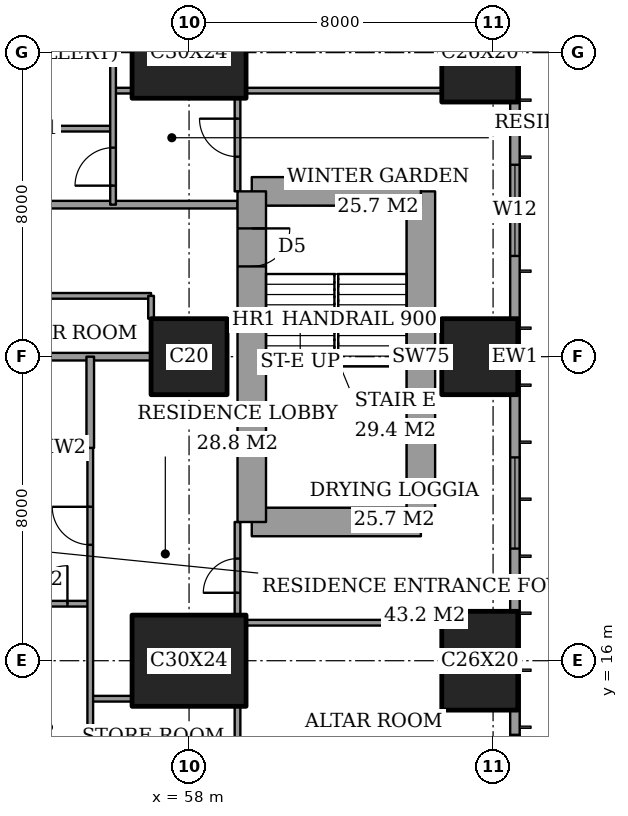
"""IFC4 building model, lengths in metres.
Left out: names, types, materials, properties, quantities, classifications, styles, units other than length and angle.
Written with IfcOpenShell. Run it as: python <this file> out.ifc"""

import sys

from ifc_helpers import new_model, si_unit, direction, frame, frame_2d, origin, origin_2d, place, context, subcontext, project, spatial, rectangle, extrude, element, fill, save


model = new_model("IFC4")
c1 = context("Model", 3, precision=1e-05, world=origin(), true_north=direction((0.0, 1.0)))
c2 = subcontext(c1, "Body", "Model", "MODEL_VIEW")
j1 = project(units=[si_unit("LENGTHUNIT", "METRE"), si_unit("PLANEANGLEUNIT", "RADIAN")], contexts=[c1])
p1 = place(None, origin())
s1 = spatial("IfcSite", under=j1, at=p1, CompositionType="ELEMENT")
p2 = place(p1, origin())
s2 = spatial("IfcBuilding", under=s1, at=p2, CompositionType="ELEMENT")
p3 = place(p2, frame((0.0, 0.0, 153.8)))
s3 = spatial("IfcBuildingStorey", under=s2, at=p3, CompositionType="ELEMENT", Elevation=153.8)
p4 = place(p3, frame((58.0, 16.0, 0.0), z_axis=(0.0, 0.0, 1.0), x_axis=(1.0, 0.0, 0.0)))
e1 = element("IfcColumn", 1, at=p4, inside=s3, PredefinedType="COLUMN", context=c2, shape_type="SweptSolid", body=[
    extrude(rectangle(XDim=3.0, YDim=2.4, at=origin_2d()), origin(), (0.0, 0.0, 1.0), 3.6),
])
p5 = place(p3, frame((58.0, 24.0, 0.0), z_axis=(0.0, 0.0, 1.0), x_axis=(1.0, 0.0, 0.0)))
e2 = element("IfcColumn", 2, at=p5, inside=s3, PredefinedType="COLUMN", context=c2, shape_type="SweptSolid", body=[
    extrude(rectangle(XDim=2.0, YDim=2.0, at=origin_2d()), origin(), (0.0, 0.0, 1.0), 3.6),
])
p6 = place(p3, frame((58.0, 32.0, 0.0), z_axis=(0.0, 0.0, 1.0), x_axis=(1.0, 0.0, 0.0)))
e3 = element("IfcColumn", 3, at=p6, inside=s3, PredefinedType="COLUMN", context=c2, shape_type="SweptSolid", body=[
    extrude(rectangle(XDim=3.0, YDim=2.4, at=origin_2d()), origin(), (0.0, 0.0, 1.0), 3.6),
])
p7 = place(p3, frame((65.65, 16.0, 0.0), z_axis=(0.0, 0.0, 1.0), x_axis=(0.0, 1.0, 0.0)))
e4 = element("IfcColumn", 4, at=p7, inside=s3, PredefinedType="COLUMN", context=c2, shape_type="SweptSolid", body=[
    extrude(rectangle(XDim=2.6, YDim=2.0, at=origin_2d()), origin(), (0.0, 0.0, 1.0), 3.6),
])
p8 = place(p3, frame((65.65, 24.0, 0.0), z_axis=(0.0, 0.0, 1.0), x_axis=(1.0, 0.0, 0.0)))
e5 = element("IfcColumn", 5, at=p8, inside=s3, PredefinedType="COLUMN", context=c2, shape_type="SweptSolid", body=[
    extrude(rectangle(XDim=2.0, YDim=2.0, at=origin_2d()), origin(), (0.0, 0.0, 1.0), 3.6),
])
p9 = place(p3, frame((65.65, 32.0, 0.0), z_axis=(0.0, 0.0, 1.0), x_axis=(0.0, 1.0, 0.0)))
e6 = element("IfcColumn", 6, at=p9, inside=s3, PredefinedType="COLUMN", context=c2, shape_type="SweptSolid", body=[
    extrude(rectangle(XDim=2.6, YDim=2.0, at=origin_2d()), origin(), (0.0, 0.0, 1.0), 3.6),
])
p10 = place(p3, frame((59.65, 19.65, 0.0), z_axis=(0.0, 0.0, 1.0), x_axis=(1.0, 0.0, 0.0)))
e7 = element("IfcWall", 7, at=p10, inside=s3, PredefinedType="SHEAR", context=c2, shape_type="SweptSolid", body=[
    extrude(rectangle(XDim=4.45, YDim=0.75, at=frame_2d((2.225, 0.0))), origin(), (0.0, 0.0, 1.0), 3.6),
])
p11 = place(p3, frame((64.1, 19.65, 0.0), z_axis=(0.0, 0.0, 1.0), x_axis=(0.0, 1.0, 0.0)))
e8 = element("IfcWall", 8, at=p11, inside=s3, PredefinedType="SHEAR", context=c2, shape_type="SweptSolid", body=[
    extrude(rectangle(XDim=8.7, YDim=0.75, at=frame_2d((4.35, 0.0))), origin(), (0.0, 0.0, 1.0), 3.6),
])
p12 = place(p3, frame((64.1, 28.35, 0.0), z_axis=(0.0, 0.0, 1.0), x_axis=(-1.0, 0.0, 0.0)))
e9 = element("IfcWall", 9, at=p12, inside=s3, PredefinedType="SHEAR", context=c2, shape_type="SweptSolid", body=[
    extrude(rectangle(XDim=4.45, YDim=0.75, at=frame_2d((2.225, 0.0))), origin(), (0.0, 0.0, 1.0), 3.6),
])
p13 = place(p3, frame((59.65, 28.35, 0.0), z_axis=(0.0, 0.0, 1.0), x_axis=(0.0, -1.0, 0.0)))
e10 = element("IfcWall", 10, at=p13, inside=s3, PredefinedType="SHEAR", context=c2, shape_type="SweptSolid", body=[
    extrude(rectangle(XDim=8.7, YDim=0.75, at=frame_2d((4.35, 0.0))), origin(), (0.0, 0.0, 1.0), 3.6),
])
p14 = place(p13, frame((0.975, 0.0, 0.0)))
e11 = element("IfcOpeningElement", 11, at=p14, cuts=e10, PredefinedType="OPENING", context=c2, shape_type="SweptSolid", body=[
    extrude(rectangle(XDim=1.0, YDim=2.1, at=frame_2d((0.5, 1.05))), frame((0.0, 0.385, 0.0), z_axis=(0.0, -1.0, 0.0), x_axis=(1.0, 0.0, 0.0)), (0.0, 0.0, 1.0), 0.77),
])
p15 = place(p3, frame((66.575, 3.175, 0.0), z_axis=(0.0, 0.0, 1.0), x_axis=(0.0, 1.0, 0.0)))
e12 = element("IfcWall", 12, at=p15, inside=s3, PredefinedType="SOLIDWALL", context=c2, shape_type="SweptSolid", body=[
    extrude(rectangle(XDim=41.65, YDim=0.25, at=frame_2d((20.825, 0.0))), origin(), (0.0, 0.0, 1.0), 3.6),
])
p16 = place(p15, frame((0.775, 0.0, 0.4)))
e13 = element("IfcOpeningElement", 13, at=p16, cuts=e12, PredefinedType="OPENING", context=c2, shape_type="SweptSolid", body=[
    extrude(rectangle(XDim=2.4, YDim=2.2, at=frame_2d((1.2, 1.1))), frame((0.0, 0.135, 0.0), z_axis=(0.0, -1.0, 0.0), x_axis=(1.0, 0.0, 0.0)), (0.0, 0.0, 1.0), 0.27),
])
p17 = place(p15, frame((6.225, 0.0, 0.4)))
e14 = element("IfcOpeningElement", 14, at=p17, cuts=e12, PredefinedType="OPENING", context=c2, shape_type="SweptSolid", body=[
    extrude(rectangle(XDim=1.2, YDim=2.2, at=frame_2d((0.6, 1.1))), frame((0.0, 0.135, 0.0), z_axis=(0.0, -1.0, 0.0), x_axis=(1.0, 0.0, 0.0)), (0.0, 0.0, 1.0), 0.27),
])
p18 = place(p15, frame((8.475, 0.0, 0.4)))
e15 = element("IfcOpeningElement", 15, at=p18, cuts=e12, PredefinedType="OPENING", context=c2, shape_type="SweptSolid", body=[
    extrude(rectangle(XDim=2.4, YDim=2.2, at=frame_2d((1.2, 1.1))), frame((0.0, 0.135, 0.0), z_axis=(0.0, -1.0, 0.0), x_axis=(1.0, 0.0, 0.0)), (0.0, 0.0, 1.0), 0.27),
])
p19 = place(p15, frame((15.775, 0.0, 0.4)))
e16 = element("IfcOpeningElement", 16, at=p19, cuts=e12, PredefinedType="OPENING", context=c2, shape_type="SweptSolid", body=[
    extrude(rectangle(XDim=2.4, YDim=2.2, at=frame_2d((1.2, 1.1))), frame((0.0, 0.135, 0.0), z_axis=(0.0, -1.0, 0.0), x_axis=(1.0, 0.0, 0.0)), (0.0, 0.0, 1.0), 0.27),
])
p20 = place(p15, frame((23.475, 0.0, 0.4)))
e17 = element("IfcOpeningElement", 17, at=p20, cuts=e12, PredefinedType="OPENING", context=c2, shape_type="SweptSolid", body=[
    extrude(rectangle(XDim=2.4, YDim=2.2, at=frame_2d((1.2, 1.1))), frame((0.0, 0.135, 0.0), z_axis=(0.0, -1.0, 0.0), x_axis=(1.0, 0.0, 0.0)), (0.0, 0.0, 1.0), 0.27),
])
p21 = place(p15, frame((30.975, 0.0, 0.4)))
e18 = element("IfcOpeningElement", 18, at=p21, cuts=e12, PredefinedType="OPENING", context=c2, shape_type="SweptSolid", body=[
    extrude(rectangle(XDim=2.4, YDim=2.2, at=frame_2d((1.2, 1.1))), frame((0.0, 0.135, 0.0), z_axis=(0.0, -1.0, 0.0), x_axis=(1.0, 0.0, 0.0)), (0.0, 0.0, 1.0), 0.27),
])
p22 = place(p15, frame((34.5, 0.0, 0.4)))
e19 = element("IfcOpeningElement", 19, at=p22, cuts=e12, PredefinedType="OPENING", context=c2, shape_type="SweptSolid", body=[
    extrude(rectangle(XDim=1.2, YDim=2.2, at=frame_2d((0.6, 1.1))), frame((0.0, 0.135, 0.0), z_axis=(0.0, -1.0, 0.0), x_axis=(1.0, 0.0, 0.0)), (0.0, 0.0, 1.0), 0.27),
])
p23 = place(p15, frame((38.475, 0.0, 0.4)))
e20 = element("IfcOpeningElement", 20, at=p23, cuts=e12, PredefinedType="OPENING", context=c2, shape_type="SweptSolid", body=[
    extrude(rectangle(XDim=2.4, YDim=2.2, at=frame_2d((1.2, 1.1))), frame((0.0, 0.135, 0.0), z_axis=(0.0, -1.0, 0.0), x_axis=(1.0, 0.0, 0.0)), (0.0, 0.0, 1.0), 0.27),
])
p24 = place(p3, frame((55.4, 15.0, 0.0), z_axis=(0.0, 0.0, 1.0), x_axis=(1.0, 0.0, 0.0)))
e21 = element("IfcWall", 21, at=p24, inside=s3, PredefinedType="PARTITIONING", context=c2, shape_type="SweptSolid", body=[
    extrude(rectangle(XDim=1.1, YDim=0.15, at=frame_2d((0.55, 0.0))), origin(), (0.0, 0.0, 1.0), 3.35),
])
p25 = place(p3, frame((59.5, 17.0, 0.0), z_axis=(0.0, 0.0, 1.0), x_axis=(1.0, 0.0, 0.0)))
e22 = element("IfcWall", 22, at=p25, inside=s3, PredefinedType="PARTITIONING", context=c2, shape_type="SweptSolid", body=[
    extrude(rectangle(XDim=5.15, YDim=0.15, at=frame_2d((2.575, 0.0))), origin(), (0.0, 0.0, 1.0), 3.35),
])
p26 = place(p3, frame((51.6, 17.5, 0.0), z_axis=(0.0, 0.0, 1.0), x_axis=(1.0, 0.0, 0.0)))
e23 = element("IfcWall", 23, at=p26, inside=s3, PredefinedType="PARTITIONING", context=c2, shape_type="SweptSolid", body=[
    extrude(rectangle(XDim=3.8, YDim=0.15, at=frame_2d((1.9, 0.0))), origin(), (0.0, 0.0, 1.0), 3.35),
])
p27 = place(p26, frame((2.2, 0.0, 0.0)))
e24 = element("IfcOpeningElement", 24, at=p27, cuts=e23, PredefinedType="OPENING", context=c2, shape_type="SweptSolid", body=[
    extrude(rectangle(XDim=1.0, YDim=2.1, at=frame_2d((0.5, 1.05))), frame((0.0, 0.085, 0.0), z_axis=(0.0, -1.0, 0.0), x_axis=(1.0, 0.0, 0.0)), (0.0, 0.0, 1.0), 0.17),
])
p28 = place(p3, frame((51.2, 21.6, 0.0), z_axis=(0.0, 0.0, 1.0), x_axis=(1.0, 0.0, 0.0)))
e25 = element("IfcWall", 25, at=p28, inside=s3, PredefinedType="PARTITIONING", context=c2, shape_type="SweptSolid", body=[
    extrude(rectangle(XDim=4.2, YDim=0.2, at=frame_2d((2.1, 0.0))), origin(), (0.0, 0.0, 1.0), 3.35),
])
p29 = place(p28, frame((1.65, 0.0, 0.0)))
e26 = element("IfcOpeningElement", 26, at=p29, cuts=e25, PredefinedType="OPENING", context=c2, shape_type="SweptSolid", body=[
    extrude(rectangle(XDim=0.9, YDim=2.1, at=frame_2d((0.45, 1.05))), frame((0.0, 0.11, 0.0), z_axis=(0.0, -1.0, 0.0), x_axis=(1.0, 0.0, 0.0)), (0.0, 0.0, 1.0), 0.22),
])
p30 = place(p3, frame((51.0, 24.0, 0.0), z_axis=(0.0, 0.0, 1.0), x_axis=(1.0, 0.0, 0.0)))
e27 = element("IfcWall", 27, at=p30, inside=s3, PredefinedType="PARTITIONING", context=c2, shape_type="SweptSolid", body=[
    extrude(rectangle(XDim=6.0, YDim=0.2, at=frame_2d((3.0, 0.0))), origin(), (0.0, 0.0, 1.0), 3.35),
])
p31 = place(p3, frame((48.6, 25.6, 0.0), z_axis=(0.0, 0.0, 1.0), x_axis=(1.0, 0.0, 0.0)))
e28 = element("IfcWall", 28, at=p31, inside=s3, PredefinedType="PARTITIONING", context=c2, shape_type="SweptSolid", body=[
    extrude(rectangle(XDim=8.4, YDim=0.15, at=frame_2d((4.2, 0.0))), origin(), (0.0, 0.0, 1.0), 3.35),
])
p32 = place(p31, frame((3.75, 0.0, 0.0)))
e29 = element("IfcOpeningElement", 29, at=p32, cuts=e28, PredefinedType="OPENING", context=c2, shape_type="SweptSolid", body=[
    extrude(rectangle(XDim=0.9, YDim=2.1, at=frame_2d((0.45, 1.05))), frame((0.0, 0.085, 0.0), z_axis=(0.0, -1.0, 0.0), x_axis=(1.0, 0.0, 0.0)), (0.0, 0.0, 1.0), 0.17),
])
p33 = place(p3, frame((42.0, 28.0, 0.0), z_axis=(0.0, 0.0, 1.0), x_axis=(1.0, 0.0, 0.0)))
e30 = element("IfcWall", 30, at=p33, inside=s3, PredefinedType="PARTITIONING", context=c2, shape_type="SweptSolid", body=[
    extrude(rectangle(XDim=17.275, YDim=0.2, at=frame_2d((8.637, 0.0))), origin(), (0.0, 0.0, 1.0), 3.35),
])
p34 = place(p33, frame((9.4, 0.0, 0.0)))
e31 = element("IfcOpeningElement", 31, at=p34, cuts=e30, PredefinedType="OPENING", context=c2, shape_type="SweptSolid", body=[
    extrude(rectangle(XDim=1.2, YDim=2.4, at=frame_2d((0.6, 1.2))), frame((0.0, 0.11, 0.0), z_axis=(0.0, -1.0, 0.0), x_axis=(1.0, 0.0, 0.0)), (0.0, 0.0, 1.0), 0.22),
])
p35 = place(p3, frame((51.6, 30.0, 0.0), z_axis=(0.0, 0.0, 1.0), x_axis=(1.0, 0.0, 0.0)))
e32 = element("IfcWall", 32, at=p35, inside=s3, PredefinedType="PARTITIONING", context=c2, shape_type="SweptSolid", body=[
    extrude(rectangle(XDim=4.4, YDim=0.15, at=frame_2d((2.2, 0.0))), origin(), (0.0, 0.0, 1.0), 3.35),
])
p36 = place(p35, frame((0.6, 0.0, 0.0)))
e33 = element("IfcOpeningElement", 33, at=p36, cuts=e32, PredefinedType="OPENING", context=c2, shape_type="SweptSolid", body=[
    extrude(rectangle(XDim=1.0, YDim=2.1, at=frame_2d((0.5, 1.05))), frame((0.0, 0.085, 0.0), z_axis=(0.0, -1.0, 0.0), x_axis=(1.0, 0.0, 0.0)), (0.0, 0.0, 1.0), 0.17),
])
p37 = place(p3, frame((56.0, 31.0, 0.0), z_axis=(0.0, 0.0, 1.0), x_axis=(1.0, 0.0, 0.0)))
e34 = element("IfcWall", 34, at=p37, inside=s3, PredefinedType="PARTITIONING", context=c2, shape_type="SweptSolid", body=[
    extrude(rectangle(XDim=0.5, YDim=0.15, at=frame_2d((0.25, 0.0))), origin(), (0.0, 0.0, 1.0), 3.35),
])
p38 = place(p3, frame((59.5, 31.0, 0.0), z_axis=(0.0, 0.0, 1.0), x_axis=(1.0, 0.0, 0.0)))
e35 = element("IfcWall", 35, at=p38, inside=s3, PredefinedType="PARTITIONING", context=c2, shape_type="SweptSolid", body=[
    extrude(rectangle(XDim=5.15, YDim=0.15, at=frame_2d((2.575, 0.0))), origin(), (0.0, 0.0, 1.0), 3.35),
])
p39 = place(p3, frame((55.4, 21.6, 0.0), z_axis=(0.0, 0.0, 1.0), x_axis=(0.0, 1.0, 0.0)))
e36 = element("IfcWall", 36, at=p39, inside=s3, PredefinedType="PARTITIONING", context=c2, shape_type="SweptSolid", body=[
    extrude(rectangle(XDim=2.4, YDim=0.2, at=frame_2d((1.2, 0.0))), origin(), (0.0, 0.0, 1.0), 3.35),
])
p40 = place(p3, frame((55.4, 11.0, 0.0), z_axis=(0.0, 0.0, 1.0), x_axis=(0.0, 1.0, 0.0)))
e37 = element("IfcWall", 37, at=p40, inside=s3, PredefinedType="PARTITIONING", context=c2, shape_type="SweptSolid", body=[
    extrude(rectangle(XDim=10.6, YDim=0.15, at=frame_2d((5.3, 0.0))), origin(), (0.0, 0.0, 1.0), 3.35),
])
p41 = place(p40, frame((8.05, 0.0, 0.0)))
e38 = element("IfcOpeningElement", 38, at=p41, cuts=e37, PredefinedType="OPENING", context=c2, shape_type="SweptSolid", body=[
    extrude(rectangle(XDim=1.0, YDim=2.1, at=frame_2d((0.5, 1.05))), frame((0.0, 0.085, 0.0), z_axis=(0.0, -1.0, 0.0), x_axis=(1.0, 0.0, 0.0)), (0.0, 0.0, 1.0), 0.17),
])
p42 = place(p3, frame((56.0, 28.0, 0.0), z_axis=(0.0, 0.0, 1.0), x_axis=(0.0, 1.0, 0.0)))
e39 = element("IfcWall", 39, at=p42, inside=s3, PredefinedType="PARTITIONING", context=c2, shape_type="SweptSolid", body=[
    extrude(rectangle(XDim=9.4, YDim=0.15, at=frame_2d((4.7, 0.0))), origin(), (0.0, 0.0, 1.0), 3.35),
])
p43 = place(p42, frame((0.5, 0.0, 0.0)))
e40 = element("IfcOpeningElement", 40, at=p43, cuts=e39, PredefinedType="OPENING", context=c2, shape_type="SweptSolid", body=[
    extrude(rectangle(XDim=1.0, YDim=2.1, at=frame_2d((0.5, 1.05))), frame((0.0, 0.085, 0.0), z_axis=(0.0, -1.0, 0.0), x_axis=(1.0, 0.0, 0.0)), (0.0, 0.0, 1.0), 0.17),
])
p44 = place(p3, frame((57.0, 25.0, 0.0), z_axis=(0.0, 0.0, 1.0), x_axis=(0.0, 1.0, 0.0)))
e41 = element("IfcWall", 41, at=p44, inside=s3, PredefinedType="PARTITIONING", context=c2, shape_type="SweptSolid", body=[
    extrude(rectangle(XDim=0.6, YDim=0.15, at=frame_2d((0.3, 0.0))), origin(), (0.0, 0.0, 1.0), 3.35),
])
p45 = place(p3, frame((59.275, 11.0, 0.0), z_axis=(0.0, 0.0, 1.0), x_axis=(0.0, 1.0, 0.0)))
e42 = element("IfcWall", 42, at=p45, inside=s3, PredefinedType="PARTITIONING", context=c2, shape_type="SweptSolid", body=[
    extrude(rectangle(XDim=3.8, YDim=0.15, at=frame_2d((1.9, 0.0))), origin(), (0.0, 0.0, 1.0), 3.35),
])
p46 = place(p3, frame((59.275, 17.2, 0.0), z_axis=(0.0, 0.0, 1.0), x_axis=(0.0, 1.0, 0.0)))
e43 = element("IfcWall", 43, at=p46, inside=s3, PredefinedType="PARTITIONING", context=c2, shape_type="SweptSolid", body=[
    extrude(rectangle(XDim=2.45, YDim=0.15, at=frame_2d((1.225, 0.0))), origin(), (0.0, 0.0, 1.0), 3.35),
])
p47 = place(p46, frame((0.587, 0.0, 0.0)))
e44 = element("IfcOpeningElement", 44, at=p47, cuts=e43, PredefinedType="OPENING", context=c2, shape_type="SweptSolid", body=[
    extrude(rectangle(XDim=0.9, YDim=2.1, at=frame_2d((0.45, 1.05))), frame((0.0, 0.085, 0.0), z_axis=(0.0, -1.0, 0.0), x_axis=(1.0, 0.0, 0.0)), (0.0, 0.0, 1.0), 0.17),
])
p48 = place(p3, frame((59.275, 28.35, 0.0), z_axis=(0.0, 0.0, 1.0), x_axis=(0.0, 1.0, 0.0)))
e45 = element("IfcWall", 45, at=p48, inside=s3, PredefinedType="PARTITIONING", context=c2, shape_type="SweptSolid", body=[
    extrude(rectangle(XDim=2.45, YDim=0.15, at=frame_2d((1.225, 0.0))), origin(), (0.0, 0.0, 1.0), 3.35),
])
p49 = place(p48, frame((0.913, 0.0, 0.0)))
e46 = element("IfcOpeningElement", 46, at=p49, cuts=e45, PredefinedType="OPENING", context=c2, shape_type="SweptSolid", body=[
    extrude(rectangle(XDim=1.0, YDim=2.1, at=frame_2d((0.5, 1.05))), frame((0.0, 0.085, 0.0), z_axis=(0.0, -1.0, 0.0), x_axis=(1.0, 0.0, 0.0)), (0.0, 0.0, 1.0), 0.17),
])
p50 = place(p18, origin())
e47 = element("IfcWindow", 47, at=p50, inside=s3, PartitioningType="SINGLE_PANEL", PredefinedType="WINDOW", context=c2, shape_type="SweptSolid", body=[
    extrude(rectangle(XDim=2.4, YDim=2.2, at=frame_2d((1.2, 1.1))), frame((0.0, 0.03, 0.0), z_axis=(0.0, -1.0, 0.0), x_axis=(1.0, 0.0, 0.0)), (0.0, 0.0, 1.0), 0.06),
])
fill(e15, e47)
p51 = place(p19, origin())
e48 = element("IfcWindow", 48, at=p51, inside=s3, PartitioningType="SINGLE_PANEL", PredefinedType="WINDOW", context=c2, shape_type="SweptSolid", body=[
    extrude(rectangle(XDim=2.4, YDim=2.2, at=frame_2d((1.2, 1.1))), frame((0.0, 0.03, 0.0), z_axis=(0.0, -1.0, 0.0), x_axis=(1.0, 0.0, 0.0)), (0.0, 0.0, 1.0), 0.06),
])
fill(e16, e48)
p52 = place(p20, origin())
e49 = element("IfcWindow", 49, at=p52, inside=s3, PartitioningType="SINGLE_PANEL", PredefinedType="WINDOW", context=c2, shape_type="SweptSolid", body=[
    extrude(rectangle(XDim=2.4, YDim=2.2, at=frame_2d((1.2, 1.1))), frame((0.0, 0.03, 0.0), z_axis=(0.0, -1.0, 0.0), x_axis=(1.0, 0.0, 0.0)), (0.0, 0.0, 1.0), 0.06),
])
fill(e17, e49)
p53 = place(p47, origin())
e50 = element("IfcDoor", 50, at=p53, inside=s3, OperationType="SINGLE_SWING_RIGHT", PredefinedType="DOOR", context=c2, shape_type="SweptSolid", body=[
    extrude(rectangle(XDim=0.9, YDim=2.1, at=frame_2d((0.45, 1.05))), frame((0.0, 0.025, 0.0), z_axis=(0.0, -1.0, 0.0), x_axis=(1.0, 0.0, 0.0)), (0.0, 0.0, 1.0), 0.05),
])
fill(e44, e50)
p54 = place(p41, origin())
e51 = element("IfcDoor", 51, at=p54, inside=s3, OperationType="SINGLE_SWING_LEFT", PredefinedType="DOOR", context=c2, shape_type="SweptSolid", body=[
    extrude(rectangle(XDim=1.0, YDim=2.1, at=frame_2d((0.5, 1.05))), frame((0.0, 0.025, 0.0), z_axis=(0.0, -1.0, 0.0), x_axis=(1.0, 0.0, 0.0)), (0.0, 0.0, 1.0), 0.05),
])
fill(e38, e51)
p55 = place(p27, origin())
e52 = element("IfcDoor", 52, at=p55, inside=s3, OperationType="SINGLE_SWING_LEFT", PredefinedType="DOOR", context=c2, shape_type="SweptSolid", body=[
    extrude(rectangle(XDim=1.0, YDim=2.1, at=frame_2d((0.5, 1.05))), frame((0.0, 0.025, 0.0), z_axis=(0.0, -1.0, 0.0), x_axis=(1.0, 0.0, 0.0)), (0.0, 0.0, 1.0), 0.05),
])
fill(e24, e52)
p56 = place(p49, origin())
e53 = element("IfcDoor", 53, at=p56, inside=s3, OperationType="SINGLE_SWING_LEFT", PredefinedType="DOOR", context=c2, shape_type="SweptSolid", body=[
    extrude(rectangle(XDim=1.0, YDim=2.1, at=frame_2d((0.5, 1.05))), frame((0.0, 0.025, 0.0), z_axis=(0.0, -1.0, 0.0), x_axis=(1.0, 0.0, 0.0)), (0.0, 0.0, 1.0), 0.05),
])
fill(e46, e53)
p57 = place(p43, origin())
e54 = element("IfcDoor", 54, at=p57, inside=s3, OperationType="SINGLE_SWING_RIGHT", PredefinedType="DOOR", context=c2, shape_type="SweptSolid", body=[
    extrude(rectangle(XDim=1.0, YDim=2.1, at=frame_2d((0.5, 1.05))), frame((0.0, 0.025, 0.0), z_axis=(0.0, -1.0, 0.0), x_axis=(1.0, 0.0, 0.0)), (0.0, 0.0, 1.0), 0.05),
])
fill(e40, e54)
p58 = place(p14, origin())
e55 = element("IfcDoor", 55, at=p58, inside=s3, OperationType="SINGLE_SWING_RIGHT", PredefinedType="DOOR", context=c2, shape_type="SweptSolid", body=[
    extrude(rectangle(XDim=1.0, YDim=2.1, at=frame_2d((0.5, 1.05))), frame((0.0, 0.025, 0.0), z_axis=(0.0, -1.0, 0.0), x_axis=(1.0, 0.0, 0.0)), (0.0, 0.0, 1.0), 0.05),
])
fill(e11, e55)
save(model, sys.argv[1])
